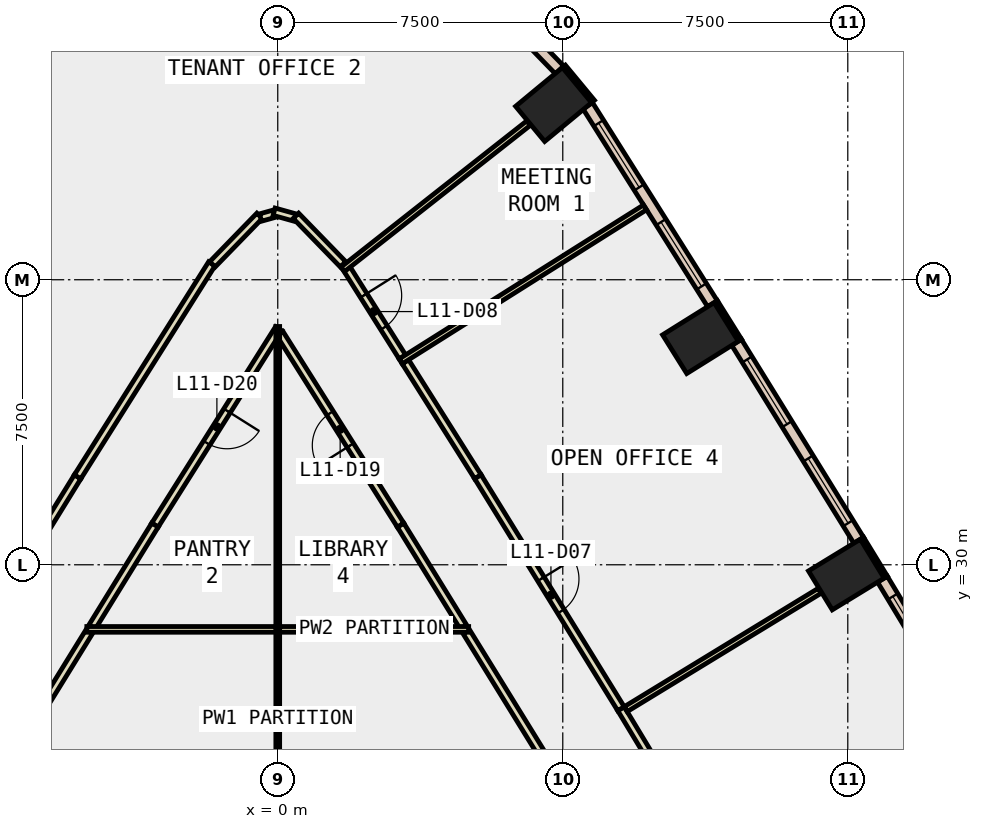
"""IFC4 building model, lengths in metres.
Left out: names, types, materials, properties, quantities, classifications, styles, units other than length and angle.
Written with IfcOpenShell. Run it as: python <this file> out.ifc"""

import sys

from ifc_helpers import new_model, si_unit, direction, frame, frame_2d, origin, origin_2d, place, context, subcontext, project, spatial, rectangle, extrude, element, fill, save


model = new_model("IFC4")
c1 = context("Model", 3, precision=1e-05, world=origin(), true_north=direction((0.0, 1.0)))
c2 = subcontext(c1, "Body", "Model", "MODEL_VIEW")
j1 = project(units=[si_unit("LENGTHUNIT", "METRE"), si_unit("PLANEANGLEUNIT", "RADIAN")], contexts=[c1])
p1 = place(None, origin())
s1 = spatial("IfcSite", under=j1, at=p1, CompositionType="ELEMENT")
p2 = place(p1, origin())
s2 = spatial("IfcBuilding", under=s1, at=p2, CompositionType="ELEMENT")
p3 = place(p2, frame((0.0, 0.0, 56.0)))
s3 = spatial("IfcBuildingStorey", under=s2, at=p3, CompositionType="ELEMENT", Elevation=56.0)
for number, where, z_axis, x_axis in (
    (1, (14.961, 29.743, -0.4), (0.0, 0.0, 1.0), (-0.522, 0.853, 0.0)),
    (2, (11.123, 35.965, -0.4), (0.0, 0.0, 1.0), (-0.53, 0.848, 0.0)),
    (3, (7.258, 42.111, -0.4), (0.0, 0.0, 1.0), (-0.638, 0.77, 0.0)),
):
    element("IfcColumn", number, at=place(p3, frame(where, z_axis=z_axis, x_axis=x_axis)), inside=s3, PredefinedType="COLUMN", context=c2, shape_type="SweptSolid", body=[
        extrude(rectangle(XDim=1.2, YDim=1.6, at=origin_2d()), origin(), (0.0, 0.0, 1.0), 4.2),
    ])
p4 = place(p3, frame((15.999, 29.674, 0.0), z_axis=(0.0, 0.0, 1.0), x_axis=(-0.521598117945, 0.853191305251, 0.0)))
e4 = element("IfcWall", 4, at=p4, inside=s3, PredefinedType="STANDARD", context=c2, shape_type="SweptSolid", body=[
    extrude(rectangle(XDim=1.2, YDim=0.1, at=frame_2d((0.6, 0.0))), origin(), (0.0, 0.0, 1.0), 3.8),
])
p5 = place(p3, frame((12.162, 35.907, 0.0), z_axis=(0.0, 0.0, 1.0), x_axis=(-0.530328162925, 0.847792450785, 0.0)))
e5 = element("IfcWall", 5, at=p5, inside=s3, PredefinedType="STANDARD", context=c2, shape_type="SweptSolid", body=[
    extrude(rectangle(XDim=1.2, YDim=0.1, at=frame_2d((0.6, 0.0))), origin(), (0.0, 0.0, 1.0), 3.8),
])
p6 = place(p3, frame((8.295, 42.191, 0.0), z_axis=(0.0, 0.0, 1.0), x_axis=(-0.637638520791, 0.770335716947, 0.0)))
e6 = element("IfcWall", 6, at=p6, inside=s3, PredefinedType="STANDARD", context=c2, shape_type="SweptSolid", body=[
    extrude(rectangle(XDim=1.199, YDim=0.1, at=frame_2d((0.6, 0.0))), origin(), (0.0, 0.0, 1.0), 3.8),
])
p7 = place(p3, frame((19.074, 24.38, 0.0), z_axis=(0.0, 0.0, 1.0), x_axis=(-0.516699243123, 0.856166976796, 0.0)))
e7 = element("IfcWall", 7, at=p7, inside=s3, PredefinedType="STANDARD", context=c2, shape_type="SweptSolid", body=[
    extrude(rectangle(XDim=6.122, YDim=0.3, at=frame_2d((3.061, 0.0))), origin(), (0.0, 0.0, 1.0), 3.8),
])
p8 = place(p7, frame((0.53, 0.0, 0.9)))
e8 = element("IfcOpeningElement", 8, at=p8, cuts=e7, PredefinedType="OPENING", context=c2, shape_type="SweptSolid", body=[
    extrude(rectangle(XDim=2.0, YDim=2.6, at=frame_2d((1.0, 1.3))), frame((0.0, 0.16, 0.0), z_axis=(0.0, -1.0, 0.0), x_axis=(1.0, 0.0, 0.0)), (0.0, 0.0, 1.0), 0.32),
])
p9 = place(p7, frame((3.591, 0.0, 0.9)))
e9 = element("IfcOpeningElement", 9, at=p9, cuts=e7, PredefinedType="OPENING", context=c2, shape_type="SweptSolid", body=[
    extrude(rectangle(XDim=2.0, YDim=2.6, at=frame_2d((1.0, 1.3))), frame((0.0, 0.16, 0.0), z_axis=(0.0, -1.0, 0.0), x_axis=(1.0, 0.0, 0.0)), (0.0, 0.0, 1.0), 0.32),
])
p10 = place(p3, frame((15.287, 30.644, 0.0), z_axis=(0.0, 0.0, 1.0), x_axis=(-0.525114088226, 0.851031840971, 0.0)))
e10 = element("IfcWall", 10, at=p10, inside=s3, PredefinedType="STANDARD", context=c2, shape_type="SweptSolid", body=[
    extrude(rectangle(XDim=6.121, YDim=0.3, at=frame_2d((3.061, 0.0))), origin(), (0.0, 0.0, 1.0), 3.8),
])
p11 = place(p10, frame((0.53, 0.0, 0.9)))
e11 = element("IfcOpeningElement", 11, at=p11, cuts=e10, PredefinedType="OPENING", context=c2, shape_type="SweptSolid", body=[
    extrude(rectangle(XDim=2.0, YDim=2.6, at=frame_2d((1.0, 1.3))), frame((0.0, 0.16, 0.0), z_axis=(0.0, -1.0, 0.0), x_axis=(1.0, 0.0, 0.0)), (0.0, 0.0, 1.0), 0.32),
])
p12 = place(p10, frame((3.591, 0.0, 0.9)))
e12 = element("IfcOpeningElement", 12, at=p12, cuts=e10, PredefinedType="OPENING", context=c2, shape_type="SweptSolid", body=[
    extrude(rectangle(XDim=2.0, YDim=2.6, at=frame_2d((1.0, 1.3))), frame((0.0, 0.16, 0.0), z_axis=(0.0, -1.0, 0.0), x_axis=(1.0, 0.0, 0.0)), (0.0, 0.0, 1.0), 0.32),
])
p13 = place(p3, frame((11.439, 36.869, 0.0), z_axis=(0.0, 0.0, 1.0), x_axis=(-0.533075127321, 0.846067910177, 0.0)))
e13 = element("IfcWall", 13, at=p13, inside=s3, PredefinedType="STANDARD", context=c2, shape_type="SweptSolid", body=[
    extrude(rectangle(XDim=6.157, YDim=0.3, at=frame_2d((3.078, 0.0))), origin(), (0.0, 0.0, 1.0), 3.8),
])
p14 = place(p13, frame((0.539, 0.0, 0.9)))
e14 = element("IfcOpeningElement", 14, at=p14, cuts=e13, PredefinedType="OPENING", context=c2, shape_type="SweptSolid", body=[
    extrude(rectangle(XDim=2.0, YDim=2.6, at=frame_2d((1.0, 1.3))), frame((0.0, 0.16, 0.0), z_axis=(0.0, -1.0, 0.0), x_axis=(1.0, 0.0, 0.0)), (0.0, 0.0, 1.0), 0.32),
])
p15 = place(p13, frame((3.618, 0.0, 0.9)))
e15 = element("IfcOpeningElement", 15, at=p15, cuts=e13, PredefinedType="OPENING", context=c2, shape_type="SweptSolid", body=[
    extrude(rectangle(XDim=2.0, YDim=2.6, at=frame_2d((1.0, 1.3))), frame((0.0, 0.16, 0.0), z_axis=(0.0, -1.0, 0.0), x_axis=(1.0, 0.0, 0.0)), (0.0, 0.0, 1.0), 0.32),
])
p16 = place(p3, frame((7.416, 43.02, 0.0), z_axis=(0.0, 0.0, 1.0), x_axis=(-0.696939827977, 0.717129609052, 0.0)))
e16 = element("IfcWall", 16, at=p16, inside=s3, PredefinedType="STANDARD", context=c2, shape_type="SweptSolid", body=[
    extrude(rectangle(XDim=3.422, YDim=0.3, at=frame_2d((1.711, 0.0))), origin(), (0.0, 0.0, 1.0), 3.8),
])
p17 = place(p16, frame((1.011, 0.0, 0.9)))
e17 = element("IfcOpeningElement", 17, at=p17, cuts=e16, PredefinedType="OPENING", context=c2, shape_type="SweptSolid", body=[
    extrude(rectangle(XDim=1.4, YDim=2.6, at=frame_2d((0.7, 1.3))), frame((0.0, 0.16, 0.0), z_axis=(0.0, -1.0, 0.0), x_axis=(1.0, 0.0, 0.0)), (0.0, 0.0, 1.0), 0.32),
])
p18 = place(p3, frame((-5.031, 45.474, 0.0), z_axis=(0.0, 0.0, 1.0), x_axis=(-0.696939827977, -0.717129609052, 0.0)))
e18 = element("IfcWall", 18, at=p18, inside=s3, PredefinedType="STANDARD", context=c2, shape_type="SweptSolid", body=[
    extrude(rectangle(XDim=3.422, YDim=0.3, at=frame_2d((1.711, 0.0))), origin(), (0.0, 0.0, 1.0), 3.8),
])
p19 = place(p18, frame((1.011, 0.0, 0.9)))
e19 = element("IfcOpeningElement", 19, at=p19, cuts=e18, PredefinedType="OPENING", context=c2, shape_type="SweptSolid", body=[
    extrude(rectangle(XDim=1.4, YDim=2.6, at=frame_2d((0.7, 1.3))), frame((0.0, 0.16, 0.0), z_axis=(0.0, -1.0, 0.0), x_axis=(1.0, 0.0, 0.0)), (0.0, 0.0, 1.0), 0.32),
])
for number, where, z_axis, x_axis in (
    (20, (7.022, 24.899, 0.0), (0.0, 0.0, 1.0), (-0.525, 0.851, 0.0)),
    (21, (-4.963, 28.236, 0.0), (0.0, 0.0, 1.0), (-0.525, -0.851, 0.0)),
):
    element("IfcWall", number, at=place(p3, frame(where, z_axis=z_axis, x_axis=x_axis)), inside=s3, PredefinedType="PARTITIONING", context=c2, shape_type="SweptSolid", body=[
        extrude(rectangle(XDim=3.921, YDim=0.2, at=frame_2d((1.961, 0.0))), origin(), (0.0, 0.0, 1.0), 3.8),
    ])
p20 = place(p3, frame((4.885, 28.364, 0.0), z_axis=(0.0, 0.0, 1.0), x_axis=(-0.525078663571, 0.851053698107, 0.0)))
e22 = element("IfcWall", 22, at=p20, inside=s3, PredefinedType="PARTITIONING", context=c2, shape_type="SweptSolid", body=[
    extrude(rectangle(XDim=3.15, YDim=0.2, at=frame_2d((1.575, 0.0))), origin(), (0.0, 0.0, 1.0), 3.8),
])
p21 = place(p3, frame((3.231, 31.045, 0.0), z_axis=(0.0, 0.0, 1.0), x_axis=(-0.533294550084, 0.845929620507, 0.0)))
e23 = element("IfcWall", 23, at=p21, inside=s3, PredefinedType="PARTITIONING", context=c2, shape_type="SweptSolid", body=[
    extrude(rectangle(XDim=5.959, YDim=0.2, at=frame_2d((2.979, 0.0))), origin(), (0.0, 0.0, 1.0), 3.8),
])
p22 = place(p21, frame((2.479, 0.0, 0.0)))
e24 = element("IfcOpeningElement", 24, at=p22, cuts=e23, PredefinedType="OPENING", context=c2, shape_type="SweptSolid", body=[
    extrude(rectangle(XDim=1.0, YDim=2.1, at=frame_2d((0.5, 1.05))), frame((0.0, 0.11, 0.0), z_axis=(0.0, -1.0, 0.0), x_axis=(1.0, 0.0, 0.0)), (0.0, 0.0, 1.0), 0.22),
])
p23 = place(p3, frame((0.027, 36.213, 0.0), z_axis=(0.0, 0.0, 1.0), x_axis=(-0.533299680037, -0.845926386438, 0.0)))
e25 = element("IfcWall", 25, at=p23, inside=s3, PredefinedType="PARTITIONING", context=c2, shape_type="SweptSolid", body=[
    extrude(rectangle(XDim=6.109, YDim=0.2, at=frame_2d((3.055, 0.0))), origin(), (0.0, 0.0, 1.0), 3.8),
])
p24 = place(p23, frame((2.554, 0.0, 0.0)))
e26 = element("IfcOpeningElement", 26, at=p24, cuts=e25, PredefinedType="OPENING", context=c2, shape_type="SweptSolid", body=[
    extrude(rectangle(XDim=1.0, YDim=2.1, at=frame_2d((0.5, 1.05))), frame((0.0, 0.11, 0.0), z_axis=(0.0, -1.0, 0.0), x_axis=(1.0, 0.0, 0.0)), (0.0, 0.0, 1.0), 0.22),
])
p25 = place(p3, frame((-3.231, 31.045, 0.0), z_axis=(0.0, 0.0, 1.0), x_axis=(-0.525078663571, -0.851053698107, 0.0)))
e27 = element("IfcWall", 27, at=p25, inside=s3, PredefinedType="PARTITIONING", context=c2, shape_type="SweptSolid", body=[
    extrude(rectangle(XDim=3.15, YDim=0.2, at=frame_2d((1.575, 0.0))), origin(), (0.0, 0.0, 1.0), 3.8),
])
p26 = place(p3, frame((9.032, 26.213, 0.0), z_axis=(0.0, 0.0, 1.0), x_axis=(0.516789314756, -0.856112611841, 0.0)))
e28 = element("IfcWall", 28, at=p26, inside=s3, PredefinedType="PARTITIONING", context=c2, shape_type="SweptSolid", body=[
    extrude(rectangle(XDim=7.32, YDim=0.2, at=frame_2d((3.66, 0.0))), origin(), (0.0, 0.0, 1.0), 3.8),
])
p27 = place(p26, frame((3.16, 0.0, 0.0)))
e29 = element("IfcOpeningElement", 29, at=p27, cuts=e28, PredefinedType="OPENING", context=c2, shape_type="SweptSolid", body=[
    extrude(rectangle(XDim=1.0, YDim=2.1, at=frame_2d((0.5, 1.05))), frame((0.0, 0.11, 0.0), z_axis=(0.0, -1.0, 0.0), x_axis=(1.0, 0.0, 0.0)), (0.0, 0.0, 1.0), 0.22),
])
p28 = place(p3, frame((3.359, 35.341, 0.0), z_axis=(0.0, 0.0, 1.0), x_axis=(0.533386910893, -0.845871386966, 0.0)))
e30 = element("IfcWall", 30, at=p28, inside=s3, PredefinedType="PARTITIONING", context=c2, shape_type="SweptSolid", body=[
    extrude(rectangle(XDim=3.578, YDim=0.2, at=frame_2d((1.789, 0.0))), origin(), (0.0, 0.0, 1.0), 3.8),
])
p29 = place(p3, frame((5.267, 32.315, 0.0), z_axis=(0.0, 0.0, 1.0), x_axis=(0.524988204957, -0.851109502153, 0.0)))
e31 = element("IfcWall", 31, at=p29, inside=s3, PredefinedType="PARTITIONING", context=c2, shape_type="SweptSolid", body=[
    extrude(rectangle(XDim=7.169, YDim=0.2, at=frame_2d((3.585, 0.0))), origin(), (0.0, 0.0, 1.0), 3.8),
])
p30 = place(p29, frame((3.16, 0.0, 0.0)))
e32 = element("IfcOpeningElement", 32, at=p30, cuts=e31, PredefinedType="OPENING", context=c2, shape_type="SweptSolid", body=[
    extrude(rectangle(XDim=1.0, YDim=2.1, at=frame_2d((0.5, 1.05))), frame((0.0, 0.11, 0.0), z_axis=(0.0, -1.0, 0.0), x_axis=(1.0, 0.0, 0.0)), (0.0, 0.0, 1.0), 0.22),
])
p31 = place(p3, frame((1.775, 37.856, 0.0), z_axis=(0.0, 0.0, 1.0), x_axis=(0.533221537001, -0.845975645322, 0.0)))
e33 = element("IfcWall", 33, at=p31, inside=s3, PredefinedType="PARTITIONING", context=c2, shape_type="SweptSolid", body=[
    extrude(rectangle(XDim=2.823, YDim=0.2, at=frame_2d((1.411, 0.0))), origin(), (0.0, 0.0, 1.0), 3.8),
])
p32 = place(p31, frame((0.911, 0.0, 0.0)))
e34 = element("IfcOpeningElement", 34, at=p32, cuts=e33, PredefinedType="OPENING", context=c2, shape_type="SweptSolid", body=[
    extrude(rectangle(XDim=1.0, YDim=2.1, at=frame_2d((0.5, 1.05))), frame((0.0, 0.11, 0.0), z_axis=(0.0, -1.0, 0.0), x_axis=(1.0, 0.0, 0.0)), (0.0, 0.0, 1.0), 0.22),
])
p33 = place(p3, frame((-9.11, 26.085, 0.0), z_axis=(0.0, 0.0, 1.0), x_axis=(0.525007100846, 0.85109784635, 0.0)))
e35 = element("IfcWall", 35, at=p33, inside=s3, PredefinedType="PARTITIONING", context=c2, shape_type="SweptSolid", body=[
    extrude(rectangle(XDim=7.32, YDim=0.2, at=frame_2d((3.66, 0.0))), origin(), (0.0, 0.0, 1.0), 3.8),
])
p34 = place(p33, frame((3.16, 0.0, 0.0)))
e36 = element("IfcOpeningElement", 36, at=p34, cuts=e35, PredefinedType="OPENING", context=c2, shape_type="SweptSolid", body=[
    extrude(rectangle(XDim=1.0, YDim=2.1, at=frame_2d((0.5, 1.05))), frame((0.0, 0.11, 0.0), z_axis=(0.0, -1.0, 0.0), x_axis=(1.0, 0.0, 0.0)), (0.0, 0.0, 1.0), 0.22),
])
p35 = place(p3, frame((-5.267, 32.315, 0.0), z_axis=(0.0, 0.0, 1.0), x_axis=(0.533195424135, 0.845992103794, 0.0)))
e37 = element("IfcWall", 37, at=p35, inside=s3, PredefinedType="PARTITIONING", context=c2, shape_type="SweptSolid", body=[
    extrude(rectangle(XDim=6.624, YDim=0.2, at=frame_2d((3.312, 0.0))), origin(), (0.0, 0.0, 1.0), 3.8),
])
p36 = place(p3, frame((-1.718, 37.906, 0.0), z_axis=(0.0, 0.0, 1.0), x_axis=(0.696949052806, 0.71712064382, 0.0)))
e38 = element("IfcWall", 38, at=p36, inside=s3, PredefinedType="PARTITIONING", context=c2, shape_type="SweptSolid", body=[
    extrude(rectangle(XDim=1.779, YDim=0.2, at=frame_2d((0.89, 0.0))), origin(), (0.0, 0.0, 1.0), 3.8),
])
p37 = place(p3, frame((-0.452, 39.137, 0.0), z_axis=(0.0, 0.0, 1.0), x_axis=(0.963347325023, 0.26825721122, 0.0)))
e39 = element("IfcWall", 39, at=p37, inside=s3, PredefinedType="PARTITIONING", context=c2, shape_type="SweptSolid", body=[
    extrude(rectangle(XDim=0.369, YDim=0.2, at=frame_2d((0.185, 0.0))), origin(), (0.0, 0.0, 1.0), 3.8),
])
p38 = place(p3, frame((-0.096, 39.29, 0.0), z_axis=(0.0, 0.0, 1.0), x_axis=(0.963110974003, -0.269104536854, 0.0)))
e40 = element("IfcWall", 40, at=p38, inside=s3, PredefinedType="PARTITIONING", context=c2, shape_type="SweptSolid", body=[
    extrude(rectangle(XDim=0.569, YDim=0.2, at=frame_2d((0.284, 0.0))), origin(), (0.0, 0.0, 1.0), 3.8),
])
p39 = place(p3, frame((0.478, 39.182, 0.0), z_axis=(0.0, 0.0, 1.0), x_axis=(0.696949052806, -0.71712064382, 0.0)))
e41 = element("IfcWall", 41, at=p39, inside=s3, PredefinedType="PARTITIONING", context=c2, shape_type="SweptSolid", body=[
    extrude(rectangle(XDim=1.779, YDim=0.2, at=frame_2d((0.89, 0.0))), origin(), (0.0, 0.0, 1.0), 3.8),
])
p40 = place(p3, frame((0.0, 23.5, 0.0), z_axis=(0.0, 0.0, 1.0), x_axis=(0.0, 1.0, 0.0)))
e42 = element("IfcWall", 42, at=p40, inside=s3, PredefinedType="PARTITIONING", context=c2, shape_type="SweptSolid", body=[
    extrude(rectangle(XDim=4.875, YDim=0.1, at=frame_2d((2.438, 0.0))), origin(), (0.0, 0.0, 1.0), 3.8),
])
for number, where, z_axis, x_axis in (
    (43, (0.05, 28.3, 0.0), (0.0, 0.0, 1.0), (1.0, 0.0, 0.0)),
    (44, (-5.024, 28.3, 0.0), (0.0, 0.0, 1.0), (1.0, 0.0, 0.0)),
):
    element("IfcWall", number, at=place(p3, frame(where, z_axis=z_axis, x_axis=x_axis)), inside=s3, PredefinedType="PARTITIONING", context=c2, shape_type="SweptSolid", body=[
        extrude(rectangle(XDim=4.974, YDim=0.15, at=frame_2d((2.487, 0.0))), origin(), (0.0, 0.0, 1.0), 3.8),
    ])
p41 = place(p3, frame((0.0, 28.375, 0.0), z_axis=(0.0, 0.0, 1.0), x_axis=(0.0, 1.0, 0.0)))
e45 = element("IfcWall", 45, at=p41, inside=s3, PredefinedType="PARTITIONING", context=c2, shape_type="SweptSolid", body=[
    extrude(rectangle(XDim=7.895, YDim=0.1, at=frame_2d((3.948, 0.0))), origin(), (0.0, 0.0, 1.0), 3.8),
])
p42 = place(p3, frame((9.156, 26.201, 0.0), z_axis=(0.0, 0.0, 1.0), x_axis=(0.853632819511, 0.520875234057, 0.0)))
e46 = element("IfcWall", 46, at=p42, inside=s3, PredefinedType="PARTITIONING", context=c2, shape_type="SweptSolid", body=[
    extrude(rectangle(XDim=5.98, YDim=0.15, at=frame_2d((2.99, 0.0))), origin(), (0.0, 0.0, 1.0), 3.8),
])
p43 = place(p3, frame((3.235, 35.352, 0.0), z_axis=(0.0, 0.0, 1.0), x_axis=(0.845987036055, 0.533203464755, 0.0)))
e47 = element("IfcWall", 47, at=p43, inside=s3, PredefinedType="PARTITIONING", context=c2, shape_type="SweptSolid", body=[
    extrude(rectangle(XDim=7.599, YDim=0.15, at=frame_2d((3.8, 0.0))), origin(), (0.0, 0.0, 1.0), 3.8),
])
p44 = place(p3, frame((1.709, 37.773, 0.0), z_axis=(0.0, 0.0, 1.0), x_axis=(0.785857956092, 0.618407044629, 0.0)))
e48 = element("IfcWall", 48, at=p44, inside=s3, PredefinedType="PARTITIONING", context=c2, shape_type="SweptSolid", body=[
    extrude(rectangle(XDim=6.223, YDim=0.15, at=frame_2d((3.111, 0.0))), origin(), (0.0, 0.0, 1.0), 3.8),
])
p45 = place(p9, origin())
e49 = element("IfcWindow", 49, at=p45, inside=s3, PartitioningType="SINGLE_PANEL", PredefinedType="WINDOW", context=c2, shape_type="SweptSolid", body=[
    extrude(rectangle(XDim=2.0, YDim=2.6, at=frame_2d((1.0, 1.3))), frame((0.0, 0.03, 0.0), z_axis=(0.0, -1.0, 0.0), x_axis=(1.0, 0.0, 0.0)), (0.0, 0.0, 1.0), 0.06),
])
fill(e9, e49)
p46 = place(p11, origin())
e50 = element("IfcWindow", 50, at=p46, inside=s3, PartitioningType="SINGLE_PANEL", PredefinedType="WINDOW", context=c2, shape_type="SweptSolid", body=[
    extrude(rectangle(XDim=2.0, YDim=2.6, at=frame_2d((1.0, 1.3))), frame((0.0, 0.03, 0.0), z_axis=(0.0, -1.0, 0.0), x_axis=(1.0, 0.0, 0.0)), (0.0, 0.0, 1.0), 0.06),
])
fill(e11, e50)
p47 = place(p12, origin())
e51 = element("IfcWindow", 51, at=p47, inside=s3, PartitioningType="SINGLE_PANEL", PredefinedType="WINDOW", context=c2, shape_type="SweptSolid", body=[
    extrude(rectangle(XDim=2.0, YDim=2.6, at=frame_2d((1.0, 1.3))), frame((0.0, 0.03, 0.0), z_axis=(0.0, -1.0, 0.0), x_axis=(1.0, 0.0, 0.0)), (0.0, 0.0, 1.0), 0.06),
])
fill(e12, e51)
p48 = place(p14, origin())
e52 = element("IfcWindow", 52, at=p48, inside=s3, PartitioningType="SINGLE_PANEL", PredefinedType="WINDOW", context=c2, shape_type="SweptSolid", body=[
    extrude(rectangle(XDim=2.0, YDim=2.6, at=frame_2d((1.0, 1.3))), frame((0.0, 0.03, 0.0), z_axis=(0.0, -1.0, 0.0), x_axis=(1.0, 0.0, 0.0)), (0.0, 0.0, 1.0), 0.06),
])
fill(e14, e52)
p49 = place(p15, origin())
e53 = element("IfcWindow", 53, at=p49, inside=s3, PartitioningType="SINGLE_PANEL", PredefinedType="WINDOW", context=c2, shape_type="SweptSolid", body=[
    extrude(rectangle(XDim=2.0, YDim=2.6, at=frame_2d((1.0, 1.3))), frame((0.0, 0.03, 0.0), z_axis=(0.0, -1.0, 0.0), x_axis=(1.0, 0.0, 0.0)), (0.0, 0.0, 1.0), 0.06),
])
fill(e15, e53)
p50 = place(p30, origin())
e54 = element("IfcDoor", 54, at=p50, inside=s3, OperationType="SINGLE_SWING_RIGHT", PredefinedType="DOOR", context=c2, shape_type="SweptSolid", body=[
    extrude(rectangle(XDim=1.0, YDim=2.1, at=frame_2d((0.5, 1.05))), frame((0.0, 0.025, 0.0), z_axis=(0.0, -1.0, 0.0), x_axis=(1.0, 0.0, 0.0)), (0.0, 0.0, 1.0), 0.05),
])
fill(e32, e54)
p51 = place(p32, origin())
e55 = element("IfcDoor", 55, at=p51, inside=s3, OperationType="SINGLE_SWING_LEFT", PredefinedType="DOOR", context=c2, shape_type="SweptSolid", body=[
    extrude(rectangle(XDim=1.0, YDim=2.1, at=frame_2d((0.5, 1.05))), frame((0.0, 0.025, 0.0), z_axis=(0.0, -1.0, 0.0), x_axis=(1.0, 0.0, 0.0)), (0.0, 0.0, 1.0), 0.05),
])
fill(e34, e55)
p52 = place(p22, origin())
e56 = element("IfcDoor", 56, at=p52, inside=s3, OperationType="SINGLE_SWING_LEFT", PredefinedType="DOOR", context=c2, shape_type="SweptSolid", body=[
    extrude(rectangle(XDim=1.0, YDim=2.1, at=frame_2d((0.5, 1.05))), frame((0.0, 0.025, 0.0), z_axis=(0.0, -1.0, 0.0), x_axis=(1.0, 0.0, 0.0)), (0.0, 0.0, 1.0), 0.05),
])
fill(e24, e56)
p53 = place(p24, origin())
e57 = element("IfcDoor", 57, at=p53, inside=s3, OperationType="SINGLE_SWING_LEFT", PredefinedType="DOOR", context=c2, shape_type="SweptSolid", body=[
    extrude(rectangle(XDim=1.0, YDim=2.1, at=frame_2d((0.5, 1.05))), frame((0.0, 0.025, 0.0), z_axis=(0.0, -1.0, 0.0), x_axis=(1.0, 0.0, 0.0)), (0.0, 0.0, 1.0), 0.05),
])
fill(e26, e57)
save(model, sys.argv[1])
